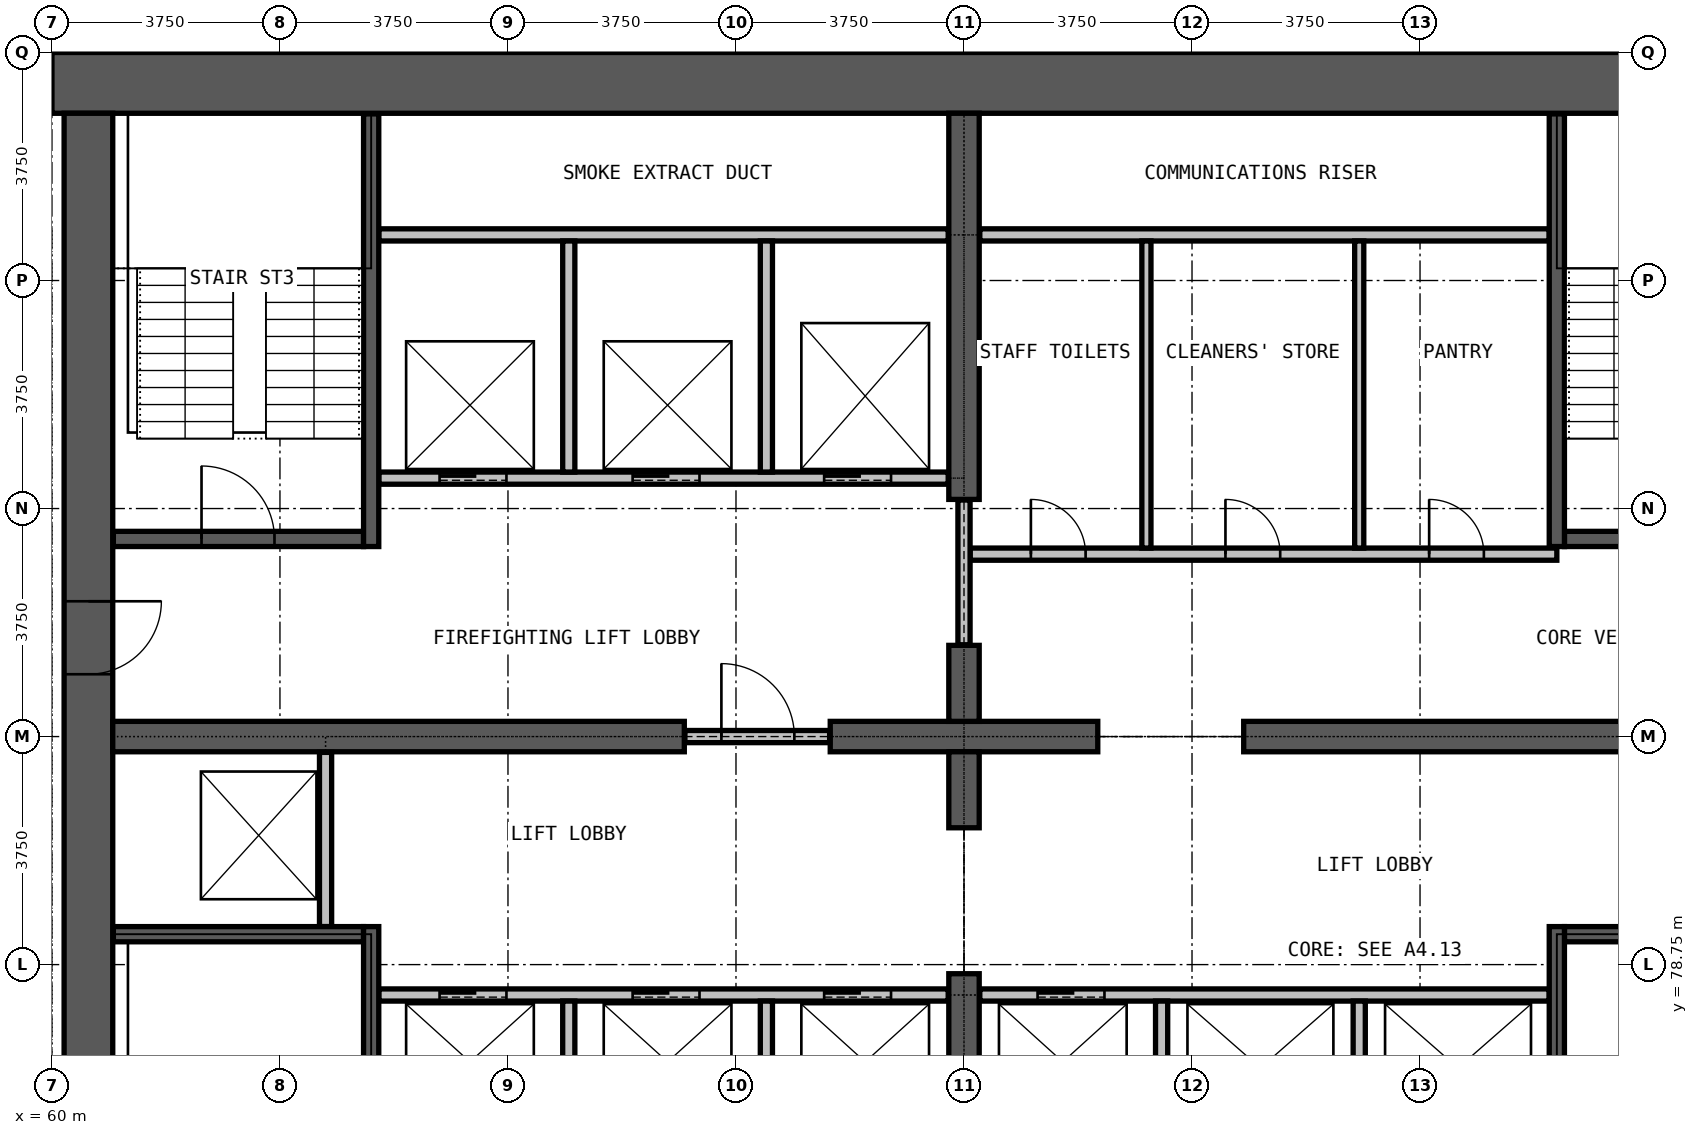
"""IFC4 building model, lengths in metres.
Left out: names, types, materials, properties, quantities, classifications, styles, units other than length and angle.
Written with IfcOpenShell. Run it as: python <this file> out.ifc"""

import sys

from ifc_helpers import new_model, si_unit, direction, frame, frame_2d, origin, place, context, subcontext, project, spatial, rectangle, extrude, element, fill, save


model = new_model("IFC4")
c1 = context("Model", 3, precision=1e-05, world=origin(), true_north=direction((0.0, 1.0)))
c2 = subcontext(c1, "Body", "Model", "MODEL_VIEW")
j1 = project(units=[si_unit("LENGTHUNIT", "METRE"), si_unit("PLANEANGLEUNIT", "RADIAN")], contexts=[c1])
p1 = place(None, origin())
s1 = spatial("IfcSite", under=j1, at=p1, CompositionType="ELEMENT")
p2 = place(p1, origin())
s2 = spatial("IfcBuilding", under=s1, at=p2, CompositionType="ELEMENT")
p3 = place(p2, frame((0.0, 0.0, 110.8)))
s3 = spatial("IfcBuildingStorey", under=s2, at=p3, CompositionType="ELEMENT", Elevation=110.8)
p4 = place(p3, frame((90.0, 93.25, 0.0), z_axis=(0.0, 0.0, 1.0), x_axis=(-1.0, 0.0, 0.0)))
e1 = element("IfcWall", 1, at=p4, inside=s3, PredefinedType="SHEAR", context=c2, shape_type="SweptSolid", body=[
    extrude(rectangle(XDim=30.0, YDim=1.0, at=frame_2d((15.0, 0.0))), origin(), (0.0, 0.0, 1.0), 3.6),
])
p5 = place(p3, frame((60.6, 92.75, 0.0), z_axis=(0.0, 0.0, 1.0), x_axis=(0.0, -1.0, 0.0)))
e2 = element("IfcWall", 2, at=p5, inside=s3, PredefinedType="SHEAR", context=c2, shape_type="SweptSolid", body=[
    extrude(rectangle(XDim=20.5, YDim=0.8, at=frame_2d((10.25, 0.0))), origin(), (0.0, 0.0, 1.0), 3.6),
])
p6 = place(p5, frame((19.025, 0.0, 0.0)))
e3 = element("IfcOpeningElement", 3, at=p6, cuts=e2, PredefinedType="OPENING", context=c2, shape_type="SweptSolid", body=[
    extrude(rectangle(XDim=1.2, YDim=2.2, at=frame_2d((0.6, 1.1))), frame((0.0, 0.41, 0.0), z_axis=(0.0, -1.0, 0.0), x_axis=(1.0, 0.0, 0.0)), (0.0, 0.0, 1.0), 0.82),
])
p7 = place(p5, frame((8.025, 0.0, 0.0)))
e4 = element("IfcOpeningElement", 4, at=p7, cuts=e2, PredefinedType="OPENING", context=c2, shape_type="SweptSolid", body=[
    extrude(rectangle(XDim=1.2, YDim=2.2, at=frame_2d((0.6, 1.1))), frame((0.0, 0.41, 0.0), z_axis=(0.0, -1.0, 0.0), x_axis=(1.0, 0.0, 0.0)), (0.0, 0.0, 1.0), 0.82),
])
p8 = place(p3, frame((61.0, 82.5, 0.0), z_axis=(0.0, 0.0, 1.0), x_axis=(1.0, 0.0, 0.0)))
e5 = element("IfcWall", 5, at=p8, inside=s3, PredefinedType="SHEAR", context=c2, shape_type="SweptSolid", body=[
    extrude(rectangle(XDim=9.4, YDim=0.5, at=frame_2d((4.7, 0.0))), origin(), (0.0, 0.0, 1.0), 3.6),
])
p9 = place(p3, frame((72.8, 82.5, 0.0), z_axis=(0.0, 0.0, 1.0), x_axis=(1.0, 0.0, 0.0)))
e6 = element("IfcWall", 6, at=p9, inside=s3, PredefinedType="SHEAR", context=c2, shape_type="SweptSolid", body=[
    extrude(rectangle(XDim=4.4, YDim=0.5, at=frame_2d((2.2, 0.0))), origin(), (0.0, 0.0, 1.0), 3.6),
])
p10 = place(p3, frame((79.6, 82.5, 0.0), z_axis=(0.0, 0.0, 1.0), x_axis=(1.0, 0.0, 0.0)))
e7 = element("IfcWall", 7, at=p10, inside=s3, PredefinedType="SHEAR", context=c2, shape_type="SweptSolid", body=[
    extrude(rectangle(XDim=9.4, YDim=0.5, at=frame_2d((4.7, 0.0))), origin(), (0.0, 0.0, 1.0), 3.6),
])
p11 = place(p3, frame((75.0, 72.25, 0.0), z_axis=(0.0, 0.0, 1.0), x_axis=(0.0, 1.0, 0.0)))
e8 = element("IfcWall", 8, at=p11, inside=s3, PredefinedType="SHEAR", context=c2, shape_type="SweptSolid", body=[
    extrude(rectangle(XDim=6.35, YDim=0.5, at=frame_2d((3.175, 0.0))), origin(), (0.0, 0.0, 1.0), 3.6),
])
for number, where, z_axis, x_axis in (
    (9, (75.0, 81.0, 0.0), (0.0, 0.0, 1.0), (0.0, 1.0, 0.0)),
    (10, (75.0, 82.75, 0.0), (0.0, 0.0, 1.0), (0.0, 1.0, 0.0)),
):
    element("IfcWall", number, at=place(p3, frame(where, z_axis=z_axis, x_axis=x_axis)), inside=s3, PredefinedType="SHEAR", context=c2, shape_type="SweptSolid", body=[
        extrude(rectangle(XDim=1.25, YDim=0.5, at=frame_2d((0.625, 0.0))), origin(), (0.0, 0.0, 1.0), 3.6),
    ])
p12 = place(p3, frame((75.0, 86.4, 0.0), z_axis=(0.0, 0.0, 1.0), x_axis=(0.0, 1.0, 0.0)))
e11 = element("IfcWall", 11, at=p12, inside=s3, PredefinedType="SHEAR", context=c2, shape_type="SweptSolid", body=[
    extrude(rectangle(XDim=6.35, YDim=0.5, at=frame_2d((3.175, 0.0))), origin(), (0.0, 0.0, 1.0), 3.6),
])
p13 = place(p3, frame((70.41, 82.5, 0.0), z_axis=(0.0, 0.0, 1.0), x_axis=(1.0, 0.0, 0.0)))
e12 = element("IfcWall", 12, at=p13, inside=s3, PredefinedType="PARTITIONING", context=c2, shape_type="SweptSolid", body=[
    extrude(rectangle(XDim=2.38, YDim=0.2, at=frame_2d((1.19, 0.0))), origin(), (0.0, 0.0, 1.0), 2.4),
])
p14 = place(p13, frame((0.6, 0.0, 0.0)))
e13 = element("IfcOpeningElement", 13, at=p14, cuts=e12, PredefinedType="OPENING", context=c2, shape_type="SweptSolid", body=[
    extrude(rectangle(XDim=1.2, YDim=2.2, at=frame_2d((0.6, 1.1))), frame((0.0, 0.11, 0.0), z_axis=(0.0, -1.0, 0.0), x_axis=(1.0, 0.0, 0.0)), (0.0, 0.0, 1.0), 0.22),
])
p15 = place(p3, frame((75.1, 85.5, 0.0), z_axis=(0.0, 0.0, 1.0), x_axis=(1.0, 0.0, 0.0)))
e14 = element("IfcWall", 14, at=p15, inside=s3, PredefinedType="PARTITIONING", context=c2, shape_type="SweptSolid", body=[
    extrude(rectangle(XDim=9.65, YDim=0.2, at=frame_2d((4.825, 0.0))), origin(), (0.0, 0.0, 1.0), 3.3),
])
p16 = place(p15, frame((1.0, 0.0, 0.0)))
e15 = element("IfcOpeningElement", 15, at=p16, cuts=e14, PredefinedType="OPENING", context=c2, shape_type="SweptSolid", body=[
    extrude(rectangle(XDim=0.9, YDim=2.2, at=frame_2d((0.45, 1.1))), frame((0.0, 0.11, 0.0), z_axis=(0.0, -1.0, 0.0), x_axis=(1.0, 0.0, 0.0)), (0.0, 0.0, 1.0), 0.22),
])
p17 = place(p15, frame((4.2, 0.0, 0.0)))
e16 = element("IfcOpeningElement", 16, at=p17, cuts=e14, PredefinedType="OPENING", context=c2, shape_type="SweptSolid", body=[
    extrude(rectangle(XDim=0.9, YDim=2.2, at=frame_2d((0.45, 1.1))), frame((0.0, 0.11, 0.0), z_axis=(0.0, -1.0, 0.0), x_axis=(1.0, 0.0, 0.0)), (0.0, 0.0, 1.0), 0.22),
])
p18 = place(p15, frame((7.55, 0.0, 0.0)))
e17 = element("IfcOpeningElement", 17, at=p18, cuts=e14, PredefinedType="OPENING", context=c2, shape_type="SweptSolid", body=[
    extrude(rectangle(XDim=0.9, YDim=2.2, at=frame_2d((0.45, 1.1))), frame((0.0, 0.11, 0.0), z_axis=(0.0, -1.0, 0.0), x_axis=(1.0, 0.0, 0.0)), (0.0, 0.0, 1.0), 0.22),
])
p19 = place(p3, frame((75.26, 90.75, 0.0), z_axis=(0.0, 0.0, 1.0), x_axis=(1.0, 0.0, 0.0)))
e18 = element("IfcWall", 18, at=p19, inside=s3, PredefinedType="PARTITIONING", context=c2, shape_type="SweptSolid", body=[
    extrude(rectangle(XDim=9.365, YDim=0.2, at=frame_2d((4.683, 0.0))), origin(), (0.0, 0.0, 1.0), 3.3),
])
p20 = place(p3, frame((75.0, 84.01, 0.0), z_axis=(0.0, 0.0, 1.0), x_axis=(0.0, 1.0, 0.0)))
e19 = element("IfcWall", 19, at=p20, inside=s3, PredefinedType="PARTITIONING", context=c2, shape_type="SweptSolid", body=[
    extrude(rectangle(XDim=2.38, YDim=0.2, at=frame_2d((1.19, 0.0))), origin(), (0.0, 0.0, 1.0), 2.4),
])
for number, where, z_axis, x_axis in (
    (20, (78.0, 85.6, 0.0), (0.0, 0.0, 1.0), (0.0, 1.0, 0.0)),
    (21, (81.5, 85.6, 0.0), (0.0, 0.0, 1.0), (0.0, 1.0, 0.0)),
):
    element("IfcWall", number, at=place(p3, frame(where, z_axis=z_axis, x_axis=x_axis)), inside=s3, PredefinedType="PARTITIONING", context=c2, shape_type="SweptSolid", body=[
        extrude(rectangle(XDim=5.05, YDim=0.15, at=frame_2d((2.525, 0.0))), origin(), (0.0, 0.0, 1.0), 3.3),
    ])
p21 = place(p3, frame((65.375, 78.25, 0.0), z_axis=(0.0, 0.0, 1.0), x_axis=(1.0, 0.0, 0.0)))
e22 = element("IfcWall", 22, at=p21, inside=s3, PredefinedType="PARTITIONING", context=c2, shape_type="SweptSolid", body=[
    extrude(rectangle(XDim=9.365, YDim=0.2, at=frame_2d((4.683, 0.0))), origin(), (0.0, 0.0, 1.0), 3.3),
])
p22 = place(p21, frame((1.0, 0.0, 0.0)))
e23 = element("IfcOpeningElement", 23, at=p22, cuts=e22, PredefinedType="OPENING", context=c2, shape_type="SweptSolid", body=[
    extrude(rectangle(XDim=1.1, YDim=2.2, at=frame_2d((0.55, 1.1))), frame((0.0, 0.11, 0.0), z_axis=(0.0, -1.0, 0.0), x_axis=(1.0, 0.0, 0.0)), (0.0, 0.0, 1.0), 0.22),
])
p23 = place(p21, frame((4.175, 0.0, 0.0)))
e24 = element("IfcOpeningElement", 24, at=p23, cuts=e22, PredefinedType="OPENING", context=c2, shape_type="SweptSolid", body=[
    extrude(rectangle(XDim=1.1, YDim=2.2, at=frame_2d((0.55, 1.1))), frame((0.0, 0.11, 0.0), z_axis=(0.0, -1.0, 0.0), x_axis=(1.0, 0.0, 0.0)), (0.0, 0.0, 1.0), 0.22),
])
p24 = place(p21, frame((7.325, 0.0, 0.0)))
e25 = element("IfcOpeningElement", 25, at=p24, cuts=e22, PredefinedType="OPENING", context=c2, shape_type="SweptSolid", body=[
    extrude(rectangle(XDim=1.1, YDim=2.2, at=frame_2d((0.55, 1.1))), frame((0.0, 0.11, 0.0), z_axis=(0.0, -1.0, 0.0), x_axis=(1.0, 0.0, 0.0)), (0.0, 0.0, 1.0), 0.22),
])
p25 = place(p3, frame((75.26, 78.25, 0.0), z_axis=(0.0, 0.0, 1.0), x_axis=(1.0, 0.0, 0.0)))
e26 = element("IfcWall", 26, at=p25, inside=s3, PredefinedType="PARTITIONING", context=c2, shape_type="SweptSolid", body=[
    extrude(rectangle(XDim=9.365, YDim=0.2, at=frame_2d((4.683, 0.0))), origin(), (0.0, 0.0, 1.0), 3.3),
])
p26 = place(p25, frame((0.95, 0.0, 0.0)))
e27 = element("IfcOpeningElement", 27, at=p26, cuts=e26, PredefinedType="OPENING", context=c2, shape_type="SweptSolid", body=[
    extrude(rectangle(XDim=1.1, YDim=2.2, at=frame_2d((0.55, 1.1))), frame((0.0, 0.11, 0.0), z_axis=(0.0, -1.0, 0.0), x_axis=(1.0, 0.0, 0.0)), (0.0, 0.0, 1.0), 0.22),
])
p27 = place(p3, frame((65.375, 86.75, 0.0), z_axis=(0.0, 0.0, 1.0), x_axis=(1.0, 0.0, 0.0)))
e28 = element("IfcWall", 28, at=p27, inside=s3, PredefinedType="PARTITIONING", context=c2, shape_type="SweptSolid", body=[
    extrude(rectangle(XDim=9.365, YDim=0.2, at=frame_2d((4.683, 0.0))), origin(), (0.0, 0.0, 1.0), 3.3),
])
p28 = place(p27, frame((1.0, 0.0, 0.0)))
e29 = element("IfcOpeningElement", 29, at=p28, cuts=e28, PredefinedType="OPENING", context=c2, shape_type="SweptSolid", body=[
    extrude(rectangle(XDim=1.1, YDim=2.2, at=frame_2d((0.55, 1.1))), frame((0.0, 0.11, 0.0), z_axis=(0.0, -1.0, 0.0), x_axis=(1.0, 0.0, 0.0)), (0.0, 0.0, 1.0), 0.22),
])
p29 = place(p27, frame((4.175, 0.0, 0.0)))
e30 = element("IfcOpeningElement", 30, at=p29, cuts=e28, PredefinedType="OPENING", context=c2, shape_type="SweptSolid", body=[
    extrude(rectangle(XDim=1.1, YDim=2.2, at=frame_2d((0.55, 1.1))), frame((0.0, 0.11, 0.0), z_axis=(0.0, -1.0, 0.0), x_axis=(1.0, 0.0, 0.0)), (0.0, 0.0, 1.0), 0.22),
])
p30 = place(p27, frame((7.325, 0.0, 0.0)))
e31 = element("IfcOpeningElement", 31, at=p30, cuts=e28, PredefinedType="OPENING", context=c2, shape_type="SweptSolid", body=[
    extrude(rectangle(XDim=1.1, YDim=2.2, at=frame_2d((0.55, 1.1))), frame((0.0, 0.11, 0.0), z_axis=(0.0, -1.0, 0.0), x_axis=(1.0, 0.0, 0.0)), (0.0, 0.0, 1.0), 0.22),
])
p31 = place(p3, frame((65.375, 90.75, 0.0), z_axis=(0.0, 0.0, 1.0), x_axis=(1.0, 0.0, 0.0)))
e32 = element("IfcWall", 32, at=p31, inside=s3, PredefinedType="PARTITIONING", context=c2, shape_type="SweptSolid", body=[
    extrude(rectangle(XDim=9.365, YDim=0.2, at=frame_2d((4.683, 0.0))), origin(), (0.0, 0.0, 1.0), 3.3),
])
p32 = place(p3, frame((64.5, 79.375, 0.0), z_axis=(0.0, 0.0, 1.0), x_axis=(0.0, 1.0, 0.0)))
e33 = element("IfcWall", 33, at=p32, inside=s3, PredefinedType="PARTITIONING", context=c2, shape_type="SweptSolid", body=[
    extrude(rectangle(XDim=2.865, YDim=0.2, at=frame_2d((1.433, 0.0))), origin(), (0.0, 0.0, 1.0), 3.3),
])
for number, where, z_axis, x_axis in (
    (34, (68.5, 74.35, 0.0), (0.0, 0.0, 1.0), (0.0, 1.0, 0.0)),
    (35, (68.5, 86.85, 0.0), (0.0, 0.0, 1.0), (0.0, 1.0, 0.0)),
    (36, (71.75, 74.35, 0.0), (0.0, 0.0, 1.0), (0.0, 1.0, 0.0)),
    (37, (71.75, 86.85, 0.0), (0.0, 0.0, 1.0), (0.0, 1.0, 0.0)),
    (38, (78.25, 74.35, 0.0), (0.0, 0.0, 1.0), (0.0, 1.0, 0.0)),
    (39, (81.5, 74.35, 0.0), (0.0, 0.0, 1.0), (0.0, 1.0, 0.0)),
):
    element("IfcWall", number, at=place(p3, frame(where, z_axis=z_axis, x_axis=x_axis)), inside=s3, PredefinedType="PARTITIONING", context=c2, shape_type="SweptSolid", body=[
        extrude(rectangle(XDim=3.8, YDim=0.2, at=frame_2d((1.9, 0.0))), origin(), (0.0, 0.0, 1.0), 3.3),
    ])
p33 = place(p3, frame((61.01, 79.25, 0.0), z_axis=(0.0, 0.0, 1.0), x_axis=(1.0, 0.0, 0.0)))
e40 = element("IfcWall", 40, at=p33, inside=s3, PredefinedType="PARTITIONING", context=c2, shape_type="SweptSolid", body=[
    extrude(rectangle(XDim=4.115, YDim=0.25, at=frame_2d((2.058, 0.0))), origin(), (0.0, 0.0, 1.0), 3.3),
])
p34 = place(p3, frame((84.875, 79.25, 0.0), z_axis=(0.0, 0.0, 1.0), x_axis=(1.0, 0.0, 0.0)))
e41 = element("IfcWall", 41, at=p34, inside=s3, PredefinedType="PARTITIONING", context=c2, shape_type="SweptSolid", body=[
    extrude(rectangle(XDim=4.125, YDim=0.25, at=frame_2d((2.062, 0.0))), origin(), (0.0, 0.0, 1.0), 3.3),
])
p35 = place(p3, frame((61.01, 85.75, 0.0), z_axis=(0.0, 0.0, 1.0), x_axis=(1.0, 0.0, 0.0)))
e42 = element("IfcWall", 42, at=p35, inside=s3, PredefinedType="PARTITIONING", context=c2, shape_type="SweptSolid", body=[
    extrude(rectangle(XDim=4.115, YDim=0.25, at=frame_2d((2.058, 0.0))), origin(), (0.0, 0.0, 1.0), 3.3),
])
p36 = place(p35, frame((1.45, 0.0, 0.0)))
e43 = element("IfcOpeningElement", 43, at=p36, cuts=e42, PredefinedType="OPENING", context=c2, shape_type="SweptSolid", body=[
    extrude(rectangle(XDim=1.2, YDim=2.2, at=frame_2d((0.6, 1.1))), frame((0.0, 0.135, 0.0), z_axis=(0.0, -1.0, 0.0), x_axis=(1.0, 0.0, 0.0)), (0.0, 0.0, 1.0), 0.27),
])
p37 = place(p3, frame((84.875, 85.75, 0.0), z_axis=(0.0, 0.0, 1.0), x_axis=(1.0, 0.0, 0.0)))
e44 = element("IfcWall", 44, at=p37, inside=s3, PredefinedType="PARTITIONING", context=c2, shape_type="SweptSolid", body=[
    extrude(rectangle(XDim=4.125, YDim=0.25, at=frame_2d((2.062, 0.0))), origin(), (0.0, 0.0, 1.0), 3.3),
])
p38 = place(p3, frame((65.25, 72.25, 0.0), z_axis=(0.0, 0.0, 1.0), x_axis=(0.0, 1.0, 0.0)))
e45 = element("IfcWall", 45, at=p38, inside=s3, PredefinedType="PARTITIONING", context=c2, shape_type="SweptSolid", body=[
    extrude(rectangle(XDim=7.125, YDim=0.25, at=frame_2d((3.562, 0.0))), origin(), (0.0, 0.0, 1.0), 3.3),
])
p39 = place(p3, frame((65.25, 85.625, 0.0), z_axis=(0.0, 0.0, 1.0), x_axis=(0.0, 1.0, 0.0)))
e46 = element("IfcWall", 46, at=p39, inside=s3, PredefinedType="PARTITIONING", context=c2, shape_type="SweptSolid", body=[
    extrude(rectangle(XDim=7.115, YDim=0.25, at=frame_2d((3.558, 0.0))), origin(), (0.0, 0.0, 1.0), 3.3),
])
p40 = place(p3, frame((84.75, 72.25, 0.0), z_axis=(0.0, 0.0, 1.0), x_axis=(0.0, 1.0, 0.0)))
e47 = element("IfcWall", 47, at=p40, inside=s3, PredefinedType="PARTITIONING", context=c2, shape_type="SweptSolid", body=[
    extrude(rectangle(XDim=7.125, YDim=0.25, at=frame_2d((3.562, 0.0))), origin(), (0.0, 0.0, 1.0), 3.3),
])
p41 = place(p3, frame((84.75, 85.625, 0.0), z_axis=(0.0, 0.0, 1.0), x_axis=(0.0, 1.0, 0.0)))
e48 = element("IfcWall", 48, at=p41, inside=s3, PredefinedType="PARTITIONING", context=c2, shape_type="SweptSolid", body=[
    extrude(rectangle(XDim=7.115, YDim=0.25, at=frame_2d((3.558, 0.0))), origin(), (0.0, 0.0, 1.0), 3.3),
])
p42 = place(p22, origin())
e49 = element("IfcDoor", 49, at=p42, inside=s3, OperationType="DOUBLE_DOOR_SLIDING", PredefinedType="DOOR", context=c2, shape_type="SweptSolid", body=[
    extrude(rectangle(XDim=1.1, YDim=2.2, at=frame_2d((0.55, 1.1))), frame((0.0, 0.025, 0.0), z_axis=(0.0, -1.0, 0.0), x_axis=(1.0, 0.0, 0.0)), (0.0, 0.0, 1.0), 0.05),
])
fill(e23, e49)
p43 = place(p23, origin())
e50 = element("IfcDoor", 50, at=p43, inside=s3, OperationType="DOUBLE_DOOR_SLIDING", PredefinedType="DOOR", context=c2, shape_type="SweptSolid", body=[
    extrude(rectangle(XDim=1.1, YDim=2.2, at=frame_2d((0.55, 1.1))), frame((0.0, 0.025, 0.0), z_axis=(0.0, -1.0, 0.0), x_axis=(1.0, 0.0, 0.0)), (0.0, 0.0, 1.0), 0.05),
])
fill(e24, e50)
p44 = place(p24, origin())
e51 = element("IfcDoor", 51, at=p44, inside=s3, OperationType="DOUBLE_DOOR_SLIDING", PredefinedType="DOOR", context=c2, shape_type="SweptSolid", body=[
    extrude(rectangle(XDim=1.1, YDim=2.2, at=frame_2d((0.55, 1.1))), frame((0.0, 0.025, 0.0), z_axis=(0.0, -1.0, 0.0), x_axis=(1.0, 0.0, 0.0)), (0.0, 0.0, 1.0), 0.05),
])
fill(e25, e51)
p45 = place(p26, origin())
e52 = element("IfcDoor", 52, at=p45, inside=s3, OperationType="DOUBLE_DOOR_SLIDING", PredefinedType="DOOR", context=c2, shape_type="SweptSolid", body=[
    extrude(rectangle(XDim=1.1, YDim=2.2, at=frame_2d((0.55, 1.1))), frame((0.0, 0.025, 0.0), z_axis=(0.0, -1.0, 0.0), x_axis=(1.0, 0.0, 0.0)), (0.0, 0.0, 1.0), 0.05),
])
fill(e27, e52)
p46 = place(p28, origin())
e53 = element("IfcDoor", 53, at=p46, inside=s3, OperationType="DOUBLE_DOOR_SLIDING", PredefinedType="DOOR", context=c2, shape_type="SweptSolid", body=[
    extrude(rectangle(XDim=1.1, YDim=2.2, at=frame_2d((0.55, 1.1))), frame((0.0, 0.025, 0.0), z_axis=(0.0, -1.0, 0.0), x_axis=(1.0, 0.0, 0.0)), (0.0, 0.0, 1.0), 0.05),
])
fill(e29, e53)
p47 = place(p29, origin())
e54 = element("IfcDoor", 54, at=p47, inside=s3, OperationType="DOUBLE_DOOR_SLIDING", PredefinedType="DOOR", context=c2, shape_type="SweptSolid", body=[
    extrude(rectangle(XDim=1.1, YDim=2.2, at=frame_2d((0.55, 1.1))), frame((0.0, 0.025, 0.0), z_axis=(0.0, -1.0, 0.0), x_axis=(1.0, 0.0, 0.0)), (0.0, 0.0, 1.0), 0.05),
])
fill(e30, e54)
p48 = place(p30, origin())
e55 = element("IfcDoor", 55, at=p48, inside=s3, OperationType="DOUBLE_DOOR_SLIDING", PredefinedType="DOOR", context=c2, shape_type="SweptSolid", body=[
    extrude(rectangle(XDim=1.1, YDim=2.2, at=frame_2d((0.55, 1.1))), frame((0.0, 0.025, 0.0), z_axis=(0.0, -1.0, 0.0), x_axis=(1.0, 0.0, 0.0)), (0.0, 0.0, 1.0), 0.05),
])
fill(e31, e55)
p49 = place(p14, origin())
e56 = element("IfcDoor", 56, at=p49, inside=s3, OperationType="SINGLE_SWING_RIGHT", PredefinedType="DOOR", context=c2, shape_type="SweptSolid", body=[
    extrude(rectangle(XDim=1.2, YDim=2.2, at=frame_2d((0.6, 1.1))), frame((0.0, 0.025, 0.0), z_axis=(0.0, -1.0, 0.0), x_axis=(1.0, 0.0, 0.0)), (0.0, 0.0, 1.0), 0.05),
])
fill(e13, e56)
p50 = place(p36, origin())
e57 = element("IfcDoor", 57, at=p50, inside=s3, OperationType="SINGLE_SWING_RIGHT", PredefinedType="DOOR", context=c2, shape_type="SweptSolid", body=[
    extrude(rectangle(XDim=1.2, YDim=2.2, at=frame_2d((0.6, 1.1))), frame((0.0, 0.025, 0.0), z_axis=(0.0, -1.0, 0.0), x_axis=(1.0, 0.0, 0.0)), (0.0, 0.0, 1.0), 0.05),
])
fill(e43, e57)
p51 = place(p7, origin())
e58 = element("IfcDoor", 58, at=p51, inside=s3, OperationType="SINGLE_SWING_LEFT", PredefinedType="DOOR", context=c2, shape_type="SweptSolid", body=[
    extrude(rectangle(XDim=1.2, YDim=2.2, at=frame_2d((0.6, 1.1))), frame((0.0, 0.025, 0.0), z_axis=(0.0, -1.0, 0.0), x_axis=(1.0, 0.0, 0.0)), (0.0, 0.0, 1.0), 0.05),
])
fill(e4, e58)
p52 = place(p16, origin())
e59 = element("IfcDoor", 59, at=p52, inside=s3, OperationType="SINGLE_SWING_RIGHT", PredefinedType="DOOR", context=c2, shape_type="SweptSolid", body=[
    extrude(rectangle(XDim=0.9, YDim=2.2, at=frame_2d((0.45, 1.1))), frame((0.0, 0.025, 0.0), z_axis=(0.0, -1.0, 0.0), x_axis=(1.0, 0.0, 0.0)), (0.0, 0.0, 1.0), 0.05),
])
fill(e15, e59)
p53 = place(p17, origin())
e60 = element("IfcDoor", 60, at=p53, inside=s3, OperationType="SINGLE_SWING_LEFT", PredefinedType="DOOR", context=c2, shape_type="SweptSolid", body=[
    extrude(rectangle(XDim=0.9, YDim=2.2, at=frame_2d((0.45, 1.1))), frame((0.0, 0.025, 0.0), z_axis=(0.0, -1.0, 0.0), x_axis=(1.0, 0.0, 0.0)), (0.0, 0.0, 1.0), 0.05),
])
fill(e16, e60)
p54 = place(p18, origin())
e61 = element("IfcDoor", 61, at=p54, inside=s3, OperationType="SINGLE_SWING_LEFT", PredefinedType="DOOR", context=c2, shape_type="SweptSolid", body=[
    extrude(rectangle(XDim=0.9, YDim=2.2, at=frame_2d((0.45, 1.1))), frame((0.0, 0.025, 0.0), z_axis=(0.0, -1.0, 0.0), x_axis=(1.0, 0.0, 0.0)), (0.0, 0.0, 1.0), 0.05),
])
fill(e17, e61)
save(model, sys.argv[1])
